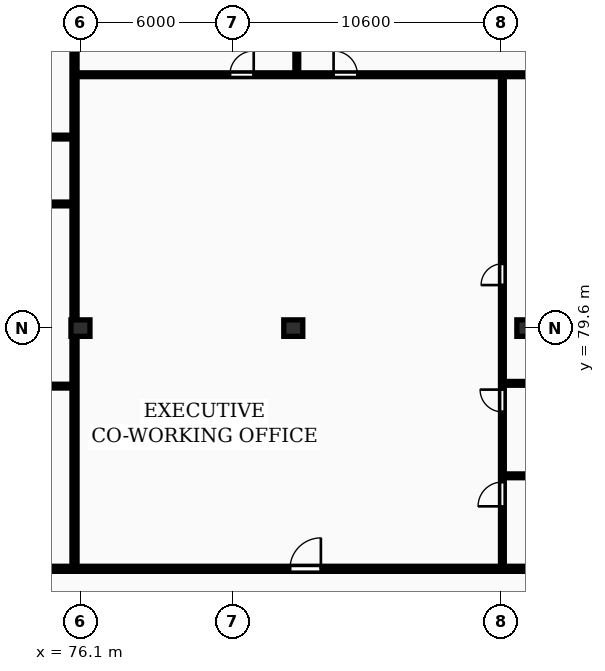
"""IFC4 building model, lengths in metres.
Left out: names, types, materials, properties, quantities, classifications, styles, units other than length and angle.
Written with IfcOpenShell. Run it as: python <this file> out.ifc"""

import sys

from ifc_helpers import new_model, si_unit, direction, frame, frame_2d, origin, origin_2d, place, context, subcontext, project, spatial, rectangle, extrude, element, fill, save


model = new_model("IFC4")
c1 = context("Model", 3, precision=1e-05, world=origin(), true_north=direction((0.0, 1.0)))
c2 = subcontext(c1, "Body", "Model", "MODEL_VIEW")
j1 = project(units=[si_unit("LENGTHUNIT", "METRE"), si_unit("PLANEANGLEUNIT", "RADIAN")], contexts=[c1])
p1 = place(None, origin())
s1 = spatial("IfcSite", under=j1, at=p1, CompositionType="ELEMENT")
p2 = place(p1, origin())
s2 = spatial("IfcBuilding", under=s1, at=p2, CompositionType="ELEMENT")
p3 = place(p2, frame((0.0, 0.0, 242.45)))
s3 = spatial("IfcBuildingStorey", under=s2, at=p3, CompositionType="ELEMENT", Elevation=242.45)
for number, where, z_axis, x_axis in (
    (1, (76.1, 79.6, 0.0), (0.0, 0.0, 1.0), (1.0, 0.0, 0.0)),
    (2, (84.5, 79.6, 0.0), (0.0, 0.0, 1.0), (1.0, 0.0, 0.0)),
    (3, (93.7, 79.6, 0.0), (0.0, 0.0, 1.0), (1.0, 0.0, 0.0)),
):
    element("IfcColumn", number, at=place(p3, frame(where, z_axis=z_axis, x_axis=x_axis)), inside=s3, PredefinedType="COLUMN", context=c2, shape_type="SweptSolid", body=[
        extrude(rectangle(XDim=0.75, YDim=0.65, at=origin_2d()), origin(), (0.0, 0.0, 1.0), 3.45),
    ])
p4 = place(p3, frame((75.865, 70.18, 0.0), z_axis=(0.0, 0.0, 1.0), x_axis=(0.0, 1.0, 0.0)))
e4 = element("IfcWall", 4, at=p4, inside=s3, PredefinedType="PARTITIONING", context=c2, shape_type="SweptSolid", body=[
    extrude(rectangle(XDim=24.32, YDim=0.2, at=frame_2d((12.16, 0.0))), origin(), (0.0, 0.0, 1.0), 2.477),
])
p5 = place(p3, frame((63.83, 77.31, 0.0), z_axis=(0.0, 0.0, 1.0), x_axis=(1.0, 0.0, 0.0)))
e5 = element("IfcWall", 5, at=p5, inside=s3, PredefinedType="PARTITIONING", context=c2, shape_type="SweptSolid", body=[
    extrude(rectangle(XDim=11.955, YDim=0.15, at=frame_2d((5.978, 0.0))), origin(), (0.0, 0.0, 1.0), 3.17),
])
p6 = place(p5, frame((1.646, 0.0, 0.0)))
e6 = element("IfcOpeningElement", 6, at=p6, cuts=e5, PredefinedType="OPENING", context=c2, shape_type="SweptSolid", body=[
    extrude(rectangle(XDim=0.88, YDim=2.06, at=frame_2d((0.44, 1.03))), frame((0.0, 0.085, 0.0), z_axis=(0.0, -1.0, 0.0), x_axis=(1.0, 0.0, 0.0)), (0.0, 0.0, 1.0), 0.17),
])
p7 = place(p3, frame((64.63, 87.14, 0.0), z_axis=(0.0, 0.0, 1.0), x_axis=(1.0, 0.0, 0.0)))
e7 = element("IfcWall", 7, at=p7, inside=s3, PredefinedType="PARTITIONING", context=c2, shape_type="SweptSolid", body=[
    extrude(rectangle(XDim=11.155, YDim=0.15, at=frame_2d((5.578, 0.0))), origin(), (0.0, 0.0, 1.0), 3.17),
])
p8 = place(p7, frame((5.158, 0.0, 0.0)))
e8 = element("IfcOpeningElement", 8, at=p8, cuts=e7, PredefinedType="OPENING", context=c2, shape_type="SweptSolid", body=[
    extrude(rectangle(XDim=0.84, YDim=2.04, at=frame_2d((0.42, 1.02))), frame((0.0, 0.085, 0.0), z_axis=(0.0, -1.0, 0.0), x_axis=(1.0, 0.0, 0.0)), (0.0, 0.0, 1.0), 0.17),
])
p9 = place(p7, frame((7.155, 0.0, 0.0)))
e9 = element("IfcOpeningElement", 9, at=p9, cuts=e7, PredefinedType="OPENING", context=c2, shape_type="SweptSolid", body=[
    extrude(rectangle(XDim=0.84, YDim=2.04, at=frame_2d((0.42, 1.02))), frame((0.0, 0.085, 0.0), z_axis=(0.0, -1.0, 0.0), x_axis=(1.0, 0.0, 0.0)), (0.0, 0.0, 1.0), 0.17),
])
p10 = place(p3, frame((59.88, 84.5, 0.0), z_axis=(0.0, 0.0, 1.0), x_axis=(1.0, 0.0, 0.0)))
e10 = element("IfcWall", 10, at=p10, inside=s3, PredefinedType="PARTITIONING", context=c2, shape_type="SweptSolid", body=[
    extrude(rectangle(XDim=15.905, YDim=0.15, at=frame_2d((7.953, 0.0))), origin(), (0.0, 0.0, 1.0), 3.17),
])
p11 = place(p10, frame((2.72, 0.0, 0.0)))
e11 = element("IfcOpeningElement", 11, at=p11, cuts=e10, PredefinedType="OPENING", context=c2, shape_type="SweptSolid", body=[
    extrude(rectangle(XDim=0.92, YDim=2.08, at=frame_2d((0.46, 1.04))), frame((0.0, 0.085, 0.0), z_axis=(0.0, -1.0, 0.0), x_axis=(1.0, 0.0, 0.0)), (0.0, 0.0, 1.0), 0.17),
])
for number, where, z_axis, x_axis in (
    (12, (92.814, 73.77, 0.0), (0.0, 0.0, 1.0), (1.0, 0.0, 0.0)),
    (13, (92.814, 77.42, 0.0), (0.0, 0.0, 1.0), (1.0, 0.0, 0.0)),
):
    element("IfcWall", number, at=place(p3, frame(where, z_axis=z_axis, x_axis=x_axis)), inside=s3, PredefinedType="PARTITIONING", context=c2, shape_type="SweptSolid", body=[
        extrude(rectangle(XDim=3.13, YDim=0.15, at=frame_2d((1.565, 0.0))), origin(), (0.0, 0.0, 1.0), 3.17),
    ])
p12 = place(p3, frame((92.754, 70.16, 0.0), z_axis=(0.0, 0.0, 1.0), x_axis=(0.0, 1.0, 0.0)))
e14 = element("IfcWall", 14, at=p12, inside=s3, PredefinedType="PARTITIONING", context=c2, shape_type="SweptSolid", body=[
    extrude(rectangle(XDim=19.38, YDim=0.15, at=frame_2d((9.69, 0.0))), origin(), (0.0, 0.0, 1.0), 3.17),
])
p13 = place(p12, frame((2.406, 0.0, 0.0)))
e15 = element("IfcOpeningElement", 15, at=p13, cuts=e14, PredefinedType="OPENING", context=c2, shape_type="SweptSolid", body=[
    extrude(rectangle(XDim=0.96, YDim=2.1, at=frame_2d((0.48, 1.05))), frame((0.0, 0.085, 0.0), z_axis=(0.0, -1.0, 0.0), x_axis=(1.0, 0.0, 0.0)), (0.0, 0.0, 1.0), 0.17),
])
p14 = place(p12, frame((6.133, 0.0, 0.0)))
e16 = element("IfcOpeningElement", 16, at=p14, cuts=e14, PredefinedType="OPENING", context=c2, shape_type="SweptSolid", body=[
    extrude(rectangle(XDim=0.88, YDim=2.06, at=frame_2d((0.44, 1.03))), frame((0.0, 0.085, 0.0), z_axis=(0.0, -1.0, 0.0), x_axis=(1.0, 0.0, 0.0)), (0.0, 0.0, 1.0), 0.17),
])
p15 = place(p12, frame((11.139, 0.0, 0.0)))
e17 = element("IfcOpeningElement", 17, at=p15, cuts=e14, PredefinedType="OPENING", context=c2, shape_type="SweptSolid", body=[
    extrude(rectangle(XDim=0.84, YDim=2.04, at=frame_2d((0.42, 1.02))), frame((0.0, 0.085, 0.0), z_axis=(0.0, -1.0, 0.0), x_axis=(1.0, 0.0, 0.0)), (0.0, 0.0, 1.0), 0.17),
])
p16 = place(p3, frame((84.64, 89.68, 0.0), z_axis=(0.0, 0.0, 1.0), x_axis=(0.0, 1.0, 0.0)))
e18 = element("IfcWall", 18, at=p16, inside=s3, PredefinedType="PARTITIONING", context=c2, shape_type="SweptSolid", body=[
    extrude(rectangle(XDim=4.82, YDim=0.15, at=frame_2d((2.41, 0.0))), origin(), (0.0, 0.0, 1.0), 2.477),
])
p17 = place(p3, frame((75.945, 89.6, 0.0), z_axis=(0.0, 0.0, 1.0), x_axis=(1.0, 0.0, 0.0)))
e19 = element("IfcWall", 19, at=p17, inside=s3, PredefinedType="PARTITIONING", context=c2, shape_type="SweptSolid", body=[
    extrude(rectangle(XDim=19.999, YDim=0.15, at=frame_2d((10.0, 0.0))), origin(), (0.0, 0.0, 1.0), 3.17),
])
p18 = place(p17, frame((6.054, 0.0, 0.0)))
e20 = element("IfcOpeningElement", 20, at=p18, cuts=e19, PredefinedType="OPENING", context=c2, shape_type="SweptSolid", body=[
    extrude(rectangle(XDim=0.94, YDim=2.1, at=frame_2d((0.47, 1.05))), frame((0.0, 0.085, 0.0), z_axis=(0.0, -1.0, 0.0), x_axis=(1.0, 0.0, 0.0)), (0.0, 0.0, 1.0), 0.17),
])
p19 = place(p17, frame((10.146, 0.0, 0.0)))
e21 = element("IfcOpeningElement", 21, at=p19, cuts=e19, PredefinedType="OPENING", context=c2, shape_type="SweptSolid", body=[
    extrude(rectangle(XDim=0.94, YDim=2.1, at=frame_2d((0.47, 1.05))), frame((0.0, 0.085, 0.0), z_axis=(0.0, -1.0, 0.0), x_axis=(1.0, 0.0, 0.0)), (0.0, 0.0, 1.0), 0.17),
])
p20 = place(p3, frame((59.8, 70.1, 0.0), z_axis=(0.0, 0.0, 1.0), x_axis=(1.0, 0.0, 0.0)))
e22 = element("IfcWall", 22, at=p20, inside=s3, PredefinedType="PARTITIONING", context=c2, shape_type="SweptSolid", body=[
    extrude(rectangle(XDim=68.6, YDim=0.2, at=frame_2d((34.3, 0.0))), origin(), (0.0, 0.0, 1.0), 3.17),
])
p21 = place(p20, frame((2.045, 0.0, 0.0)))
e23 = element("IfcOpeningElement", 23, at=p21, cuts=e22, PredefinedType="OPENING", context=c2, shape_type="SweptSolid", body=[
    extrude(rectangle(XDim=0.95, YDim=2.15, at=frame_2d((0.475, 1.075))), frame((0.0, 0.11, 0.0), z_axis=(0.0, -1.0, 0.0), x_axis=(1.0, 0.0, 0.0)), (0.0, 0.0, 1.0), 0.22),
])
p22 = place(p20, frame((24.57, 0.0, 0.0)))
e24 = element("IfcOpeningElement", 24, at=p22, cuts=e22, PredefinedType="OPENING", context=c2, shape_type="SweptSolid", body=[
    extrude(rectangle(XDim=1.22, YDim=2.18, at=frame_2d((0.61, 1.09))), frame((0.0, 0.11, 0.0), z_axis=(0.0, -1.0, 0.0), x_axis=(1.0, 0.0, 0.0)), (0.0, 0.0, 1.0), 0.22),
])
p23 = place(p20, frame((43.507, 0.0, 0.0)))
e25 = element("IfcOpeningElement", 25, at=p23, cuts=e22, PredefinedType="OPENING", context=c2, shape_type="SweptSolid", body=[
    extrude(rectangle(XDim=1.22, YDim=2.18, at=frame_2d((0.61, 1.09))), frame((0.0, 0.11, 0.0), z_axis=(0.0, -1.0, 0.0), x_axis=(1.0, 0.0, 0.0)), (0.0, 0.0, 1.0), 0.22),
])
p24 = place(p20, frame((56.214, 0.0, 0.0)))
e26 = element("IfcOpeningElement", 26, at=p24, cuts=e22, PredefinedType="OPENING", context=c2, shape_type="SweptSolid", body=[
    extrude(rectangle(XDim=0.95, YDim=2.15, at=frame_2d((0.475, 1.075))), frame((0.0, 0.11, 0.0), z_axis=(0.0, -1.0, 0.0), x_axis=(1.0, 0.0, 0.0)), (0.0, 0.0, 1.0), 0.22),
])
p25 = place(p13, origin())
e27 = element("IfcDoor", 27, at=p25, inside=s3, OperationType="SINGLE_SWING_LEFT", PredefinedType="DOOR", context=c2, shape_type="SweptSolid", body=[
    extrude(rectangle(XDim=0.96, YDim=2.1, at=frame_2d((0.48, 1.05))), frame((0.0, 0.025, 0.0), z_axis=(0.0, -1.0, 0.0), x_axis=(1.0, 0.0, 0.0)), (0.0, 0.0, 1.0), 0.05),
])
fill(e15, e27)
p26 = place(p14, origin())
e28 = element("IfcDoor", 28, at=p26, inside=s3, OperationType="SINGLE_SWING_RIGHT", PredefinedType="DOOR", context=c2, shape_type="SweptSolid", body=[
    extrude(rectangle(XDim=0.88, YDim=2.06, at=frame_2d((0.44, 1.03))), frame((0.0, 0.025, 0.0), z_axis=(0.0, -1.0, 0.0), x_axis=(1.0, 0.0, 0.0)), (0.0, 0.0, 1.0), 0.05),
])
fill(e16, e28)
p27 = place(p15, origin())
e29 = element("IfcDoor", 29, at=p27, inside=s3, OperationType="SINGLE_SWING_LEFT", PredefinedType="DOOR", context=c2, shape_type="SweptSolid", body=[
    extrude(rectangle(XDim=0.84, YDim=2.04, at=frame_2d((0.42, 1.02))), frame((0.0, 0.025, 0.0), z_axis=(0.0, -1.0, 0.0), x_axis=(1.0, 0.0, 0.0)), (0.0, 0.0, 1.0), 0.05),
])
fill(e17, e29)
p28 = place(p18, origin())
e30 = element("IfcDoor", 30, at=p28, inside=s3, OperationType="SINGLE_SWING_RIGHT", PredefinedType="DOOR", context=c2, shape_type="SweptSolid", body=[
    extrude(rectangle(XDim=0.94, YDim=2.1, at=frame_2d((0.47, 1.05))), frame((0.0, 0.025, 0.0), z_axis=(0.0, -1.0, 0.0), x_axis=(1.0, 0.0, 0.0)), (0.0, 0.0, 1.0), 0.05),
])
fill(e20, e30)
p29 = place(p19, origin())
e31 = element("IfcDoor", 31, at=p29, inside=s3, OperationType="SINGLE_SWING_LEFT", PredefinedType="DOOR", context=c2, shape_type="SweptSolid", body=[
    extrude(rectangle(XDim=0.94, YDim=2.1, at=frame_2d((0.47, 1.05))), frame((0.0, 0.025, 0.0), z_axis=(0.0, -1.0, 0.0), x_axis=(1.0, 0.0, 0.0)), (0.0, 0.0, 1.0), 0.05),
])
fill(e21, e31)
p30 = place(p22, origin())
e32 = element("IfcDoor", 32, at=p30, inside=s3, OperationType="SINGLE_SWING_RIGHT", PredefinedType="DOOR", context=c2, shape_type="SweptSolid", body=[
    extrude(rectangle(XDim=1.22, YDim=2.18, at=frame_2d((0.61, 1.09))), frame((0.0, 0.025, 0.0), z_axis=(0.0, -1.0, 0.0), x_axis=(1.0, 0.0, 0.0)), (0.0, 0.0, 1.0), 0.05),
])
fill(e24, e32)
save(model, sys.argv[1])
